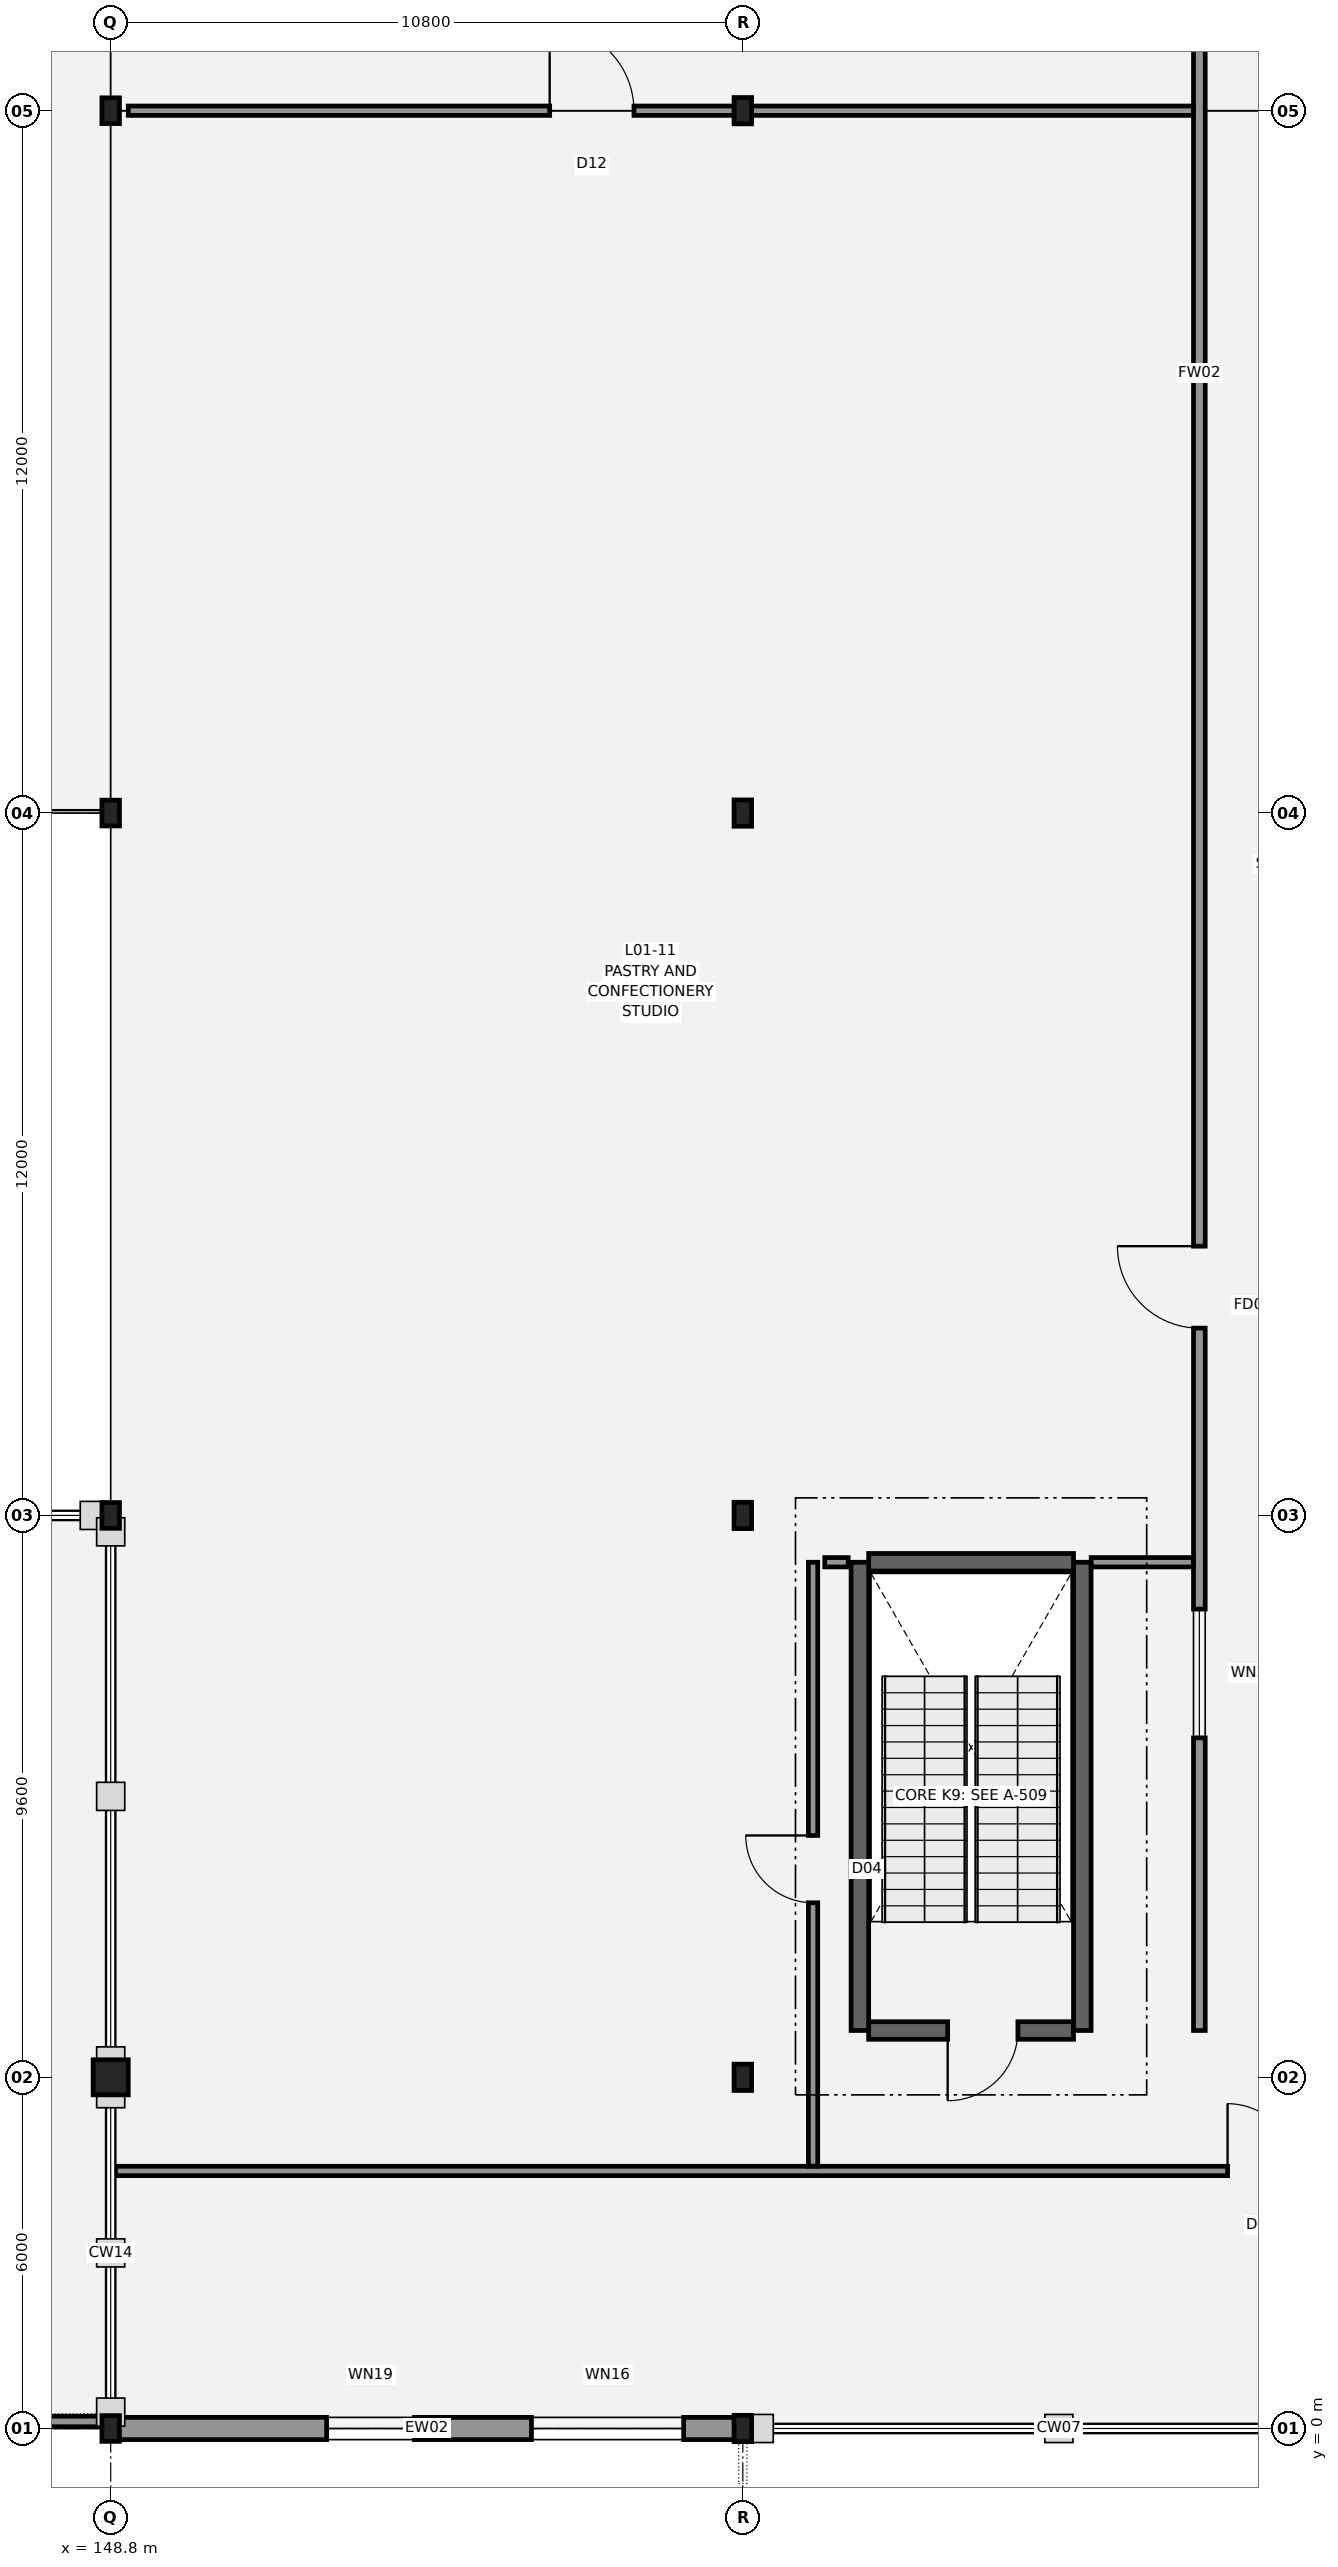
"""IFC4 building model, lengths in metres.
Left out: names, types, materials, properties, quantities, classifications, styles, units other than length and angle.
Written with IfcOpenShell. Run it as: python <this file> out.ifc"""

import sys

from ifc_helpers import new_model, si_unit, direction, frame, frame_2d, origin, origin_2d, place, context, subcontext, project, spatial, rectangle, i_section, extrude, element, fill, save


model = new_model("IFC4")
c1 = context("Model", 3, precision=1e-05, world=origin(), true_north=direction((0.0, 1.0)))
c2 = subcontext(c1, "Body", "Model", "MODEL_VIEW")
j1 = project(units=[si_unit("LENGTHUNIT", "METRE"), si_unit("PLANEANGLEUNIT", "RADIAN")], contexts=[c1])
p1 = place(None, origin())
s1 = spatial("IfcSite", under=j1, at=p1, CompositionType="ELEMENT")
p2 = place(p1, origin())
s2 = spatial("IfcBuilding", under=s1, at=p2, CompositionType="ELEMENT")
p3 = place(p2, frame((0.0, 0.0, 5.4)))
s3 = spatial("IfcBuildingStorey", under=s2, at=p3, CompositionType="ELEMENT", Elevation=5.4)
p4 = place(p3, frame((148.8, 0.0, 0.0), z_axis=(0.0, 0.0, 1.0), x_axis=(1.0, 0.0, 0.0)))
e1 = element("IfcColumn", 1, at=p4, inside=s3, PredefinedType="COLUMN", context=c2, shape_type="SweptSolid", body=[
    extrude(i_section(OverallWidth=0.3, OverallDepth=0.44, WebThickness=0.011, FlangeThickness=0.021, FilletRadius=0.027, at=origin_2d()), origin(), (0.0, 0.0, 1.0), 4.8),
])
p5 = place(p3, frame((148.8, 6.0, 0.0), z_axis=(0.0, 0.0, 1.0), x_axis=(1.0, 0.0, 0.0)))
e2 = element("IfcColumn", 2, at=p5, inside=s3, PredefinedType="COLUMN", context=c2, shape_type="SweptSolid", body=[
    extrude(rectangle(XDim=0.6, YDim=0.6, at=origin_2d()), origin(), (0.0, 0.0, 1.0), 4.8),
])
for number, where, z_axis, x_axis in (
    (3, (148.8, 15.6, 0.0), (0.0, 0.0, 1.0), (1.0, 0.0, 0.0)),
    (4, (148.8, 27.6, 0.0), (0.0, 0.0, 1.0), (1.0, 0.0, 0.0)),
    (5, (148.8, 39.6, 0.0), (0.0, 0.0, 1.0), (1.0, 0.0, 0.0)),
):
    element("IfcColumn", number, at=place(p3, frame(where, z_axis=z_axis, x_axis=x_axis)), inside=s3, PredefinedType="COLUMN", context=c2, shape_type="SweptSolid", body=[
        extrude(i_section(OverallWidth=0.3, OverallDepth=0.44, WebThickness=0.011, FlangeThickness=0.021, FilletRadius=0.027, at=origin_2d()), origin(), (0.0, 0.0, 1.0), 4.8),
    ])
for number, where, z_axis, x_axis in (
    (6, (159.6, 0.0, 0.0), (0.0, 0.0, 1.0), (1.0, 0.0, 0.0)),
    (7, (159.6, 6.0, 0.0), (0.0, 0.0, 1.0), (1.0, 0.0, 0.0)),
    (8, (159.6, 15.6, 0.0), (0.0, 0.0, 1.0), (1.0, 0.0, 0.0)),
    (9, (159.6, 27.6, 0.0), (0.0, 0.0, 1.0), (1.0, 0.0, 0.0)),
    (10, (159.6, 39.6, 0.0), (0.0, 0.0, 1.0), (1.0, 0.0, 0.0)),
):
    element("IfcColumn", number, at=place(p3, frame(where, z_axis=z_axis, x_axis=x_axis)), inside=s3, PredefinedType="COLUMN", context=c2, shape_type="SweptSolid", body=[
        extrude(i_section(OverallWidth=0.3, OverallDepth=0.45, WebThickness=0.014, FlangeThickness=0.026, FilletRadius=0.027, at=origin_2d()), origin(), (0.0, 0.0, 1.0), 4.8),
    ])
p6 = place(p3, frame((165.25, 6.8, 0.0), z_axis=(0.0, 0.0, 1.0), x_axis=(-1.0, 0.0, 0.0)))
e11 = element("IfcWall", 11, at=p6, inside=s3, PredefinedType="SHEAR", context=c2, shape_type="SweptSolid", body=[
    extrude(rectangle(XDim=3.5, YDim=0.3, at=frame_2d((1.75, 0.0))), origin(), (0.0, 0.0, 1.0), 4.49),
])
p7 = place(p6, frame((0.95, 0.0, 0.0)))
e12 = element("IfcOpeningElement", 12, at=p7, cuts=e11, PredefinedType="OPENING", context=c2, shape_type="SweptSolid", body=[
    extrude(rectangle(XDim=1.2, YDim=2.2, at=frame_2d((0.6, 1.1))), frame((0.0, 0.16, 0.0), z_axis=(0.0, -1.0, 0.0), x_axis=(1.0, 0.0, 0.0)), (0.0, 0.0, 1.0), 0.32),
])
p8 = place(p3, frame((165.4, 6.8, 0.0), z_axis=(0.0, 0.0, 1.0), x_axis=(0.0, 1.0, 0.0)))
e13 = element("IfcWall", 13, at=p8, inside=s3, PredefinedType="SHEAR", context=c2, shape_type="SweptSolid", body=[
    extrude(rectangle(XDim=8.0, YDim=0.3, at=frame_2d((4.0, 0.0))), origin(), (0.0, 0.0, 1.0), 4.49),
])
p9 = place(p3, frame((165.25, 14.8, 0.0), z_axis=(0.0, 0.0, 1.0), x_axis=(-1.0, 0.0, 0.0)))
e14 = element("IfcWall", 14, at=p9, inside=s3, PredefinedType="SHEAR", context=c2, shape_type="SweptSolid", body=[
    extrude(rectangle(XDim=3.5, YDim=0.3, at=frame_2d((1.75, 0.0))), origin(), (0.0, 0.0, 1.0), 4.49),
])
p10 = place(p3, frame((161.6, 14.8, 0.0), z_axis=(0.0, 0.0, 1.0), x_axis=(0.0, -1.0, 0.0)))
e15 = element("IfcWall", 15, at=p10, inside=s3, PredefinedType="SHEAR", context=c2, shape_type="SweptSolid", body=[
    extrude(rectangle(XDim=8.0, YDim=0.3, at=frame_2d((4.0, 0.0))), origin(), (0.0, 0.0, 1.0), 4.49),
])
p11 = place(p3, frame((159.589, 0.0, 0.0), z_axis=(0.0, 0.0, 1.0), x_axis=(-1.0, 0.0, 0.0)))
e16 = element("IfcWall", 16, at=p11, inside=s3, PredefinedType="STANDARD", context=c2, shape_type="SweptSolid", body=[
    extrude(rectangle(XDim=10.779, YDim=0.38, at=frame_2d((5.39, 0.0))), origin(), (0.0, 0.0, 1.0), 4.045),
])
p12 = place(p11, frame((1.0, 0.0, 0.8)))
e17 = element("IfcOpeningElement", 17, at=p12, cuts=e16, PredefinedType="OPENING", context=c2, shape_type="SweptSolid", body=[
    extrude(rectangle(XDim=2.6, YDim=1.4, at=frame_2d((1.3, 0.7))), frame((0.0, 0.2, 0.0), z_axis=(0.0, -1.0, 0.0), x_axis=(1.0, 0.0, 0.0)), (0.0, 0.0, 1.0), 0.4),
])
p13 = place(p11, frame((5.6, 0.0, 0.8)))
e18 = element("IfcOpeningElement", 18, at=p13, cuts=e16, PredefinedType="OPENING", context=c2, shape_type="SweptSolid", body=[
    extrude(rectangle(XDim=1.5, YDim=1.6, at=frame_2d((0.75, 0.8))), frame((0.0, 0.2, 0.0), z_axis=(0.0, -1.0, 0.0), x_axis=(1.0, 0.0, 0.0)), (0.0, 0.0, 1.0), 0.4),
])
p14 = place(p3, frame((125.0, 0.12, 0.6), z_axis=(0.0, 0.0, 1.0), x_axis=(1.0, 0.0, 0.0)))
e19 = element("IfcWall", 19, at=p14, inside=s3, PredefinedType="PARAPET", context=c2, shape_type="SweptSolid", body=[
    extrude(rectangle(XDim=23.6, YDim=0.18, at=frame_2d((11.8, 0.0))), origin(), (0.0, 0.0, 1.0), 0.26),
])
p15 = place(p3, frame((148.882, 4.4, 0.0), z_axis=(0.0, 0.0, 1.0), x_axis=(1.0, 0.0, 0.0)))
e20 = element("IfcWall", 20, at=p15, inside=s3, PredefinedType="PARTITIONING", context=c2, shape_type="SweptSolid", body=[
    extrude(rectangle(XDim=42.926, YDim=0.16, at=frame_2d((21.463, 0.0))), origin(), (0.0, 0.0, 1.0), 4.44),
])
p16 = place(p15, frame((19.0, 0.0, 0.0)))
e21 = element("IfcOpeningElement", 21, at=p16, cuts=e20, PredefinedType="OPENING", context=c2, shape_type="SweptSolid", body=[
    extrude(rectangle(XDim=1.15, YDim=2.15, at=frame_2d((0.575, 1.075))), frame((0.0, 0.09, 0.0), z_axis=(0.0, -1.0, 0.0), x_axis=(1.0, 0.0, 0.0)), (0.0, 0.0, 1.0), 0.18),
])
p17 = place(p3, frame((167.4, 6.8, 0.0), z_axis=(0.0, 0.0, 1.0), x_axis=(0.0, 1.0, 0.0)))
e22 = element("IfcWall", 22, at=p17, inside=s3, PredefinedType="PARTITIONING", context=c2, shape_type="SweptSolid", body=[
    extrude(rectangle(XDim=56.628, YDim=0.2, at=frame_2d((28.314, 0.0))), origin(), (0.0, 0.0, 1.0), 4.44),
])
p18 = place(p17, frame((12.0, 0.0, 0.0)))
e23 = element("IfcOpeningElement", 23, at=p18, cuts=e22, PredefinedType="OPENING", context=c2, shape_type="SweptSolid", body=[
    extrude(rectangle(XDim=1.4, YDim=2.2, at=frame_2d((0.7, 1.1))), frame((0.0, 0.11, 0.0), z_axis=(0.0, -1.0, 0.0), x_axis=(1.0, 0.0, 0.0)), (0.0, 0.0, 1.0), 0.22),
])
p19 = place(p17, frame((40.133, 0.0, 0.0)))
e24 = element("IfcOpeningElement", 24, at=p19, cuts=e22, PredefinedType="OPENING", context=c2, shape_type="SweptSolid", body=[
    extrude(rectangle(XDim=1.4, YDim=2.2, at=frame_2d((0.7, 1.1))), frame((0.0, 0.11, 0.0), z_axis=(0.0, -1.0, 0.0), x_axis=(1.0, 0.0, 0.0)), (0.0, 0.0, 1.0), 0.22),
])
p20 = place(p17, frame((5.0, 0.0, 1.05)))
e25 = element("IfcOpeningElement", 25, at=p20, cuts=e22, PredefinedType="OPENING", context=c2, shape_type="SweptSolid", body=[
    extrude(rectangle(XDim=2.2, YDim=1.3, at=frame_2d((1.1, 0.65))), frame((0.0, 0.11, 0.0), z_axis=(0.0, -1.0, 0.0), x_axis=(1.0, 0.0, 0.0)), (0.0, 0.0, 1.0), 0.22),
])
p21 = place(p3, frame((160.8, 4.482, 0.0), z_axis=(0.0, 0.0, 1.0), x_axis=(0.0, 1.0, 0.0)))
e26 = element("IfcWall", 26, at=p21, inside=s3, PredefinedType="PARTITIONING", context=c2, shape_type="SweptSolid", body=[
    extrude(rectangle(XDim=10.318, YDim=0.16, at=frame_2d((5.159, 0.0))), origin(), (0.0, 0.0, 1.0), 4.44),
])
p22 = place(p21, frame((4.5, 0.0, 0.0)))
e27 = element("IfcOpeningElement", 27, at=p22, cuts=e26, PredefinedType="OPENING", context=c2, shape_type="SweptSolid", body=[
    extrude(rectangle(XDim=1.15, YDim=2.15, at=frame_2d((0.575, 1.075))), frame((0.0, 0.09, 0.0), z_axis=(0.0, -1.0, 0.0), x_axis=(1.0, 0.0, 0.0)), (0.0, 0.0, 1.0), 0.18),
])
p23 = place(p3, frame((161.0, 14.8, 0.0), z_axis=(0.0, 0.0, 1.0), x_axis=(1.0, 0.0, 0.0)))
e28 = element("IfcWall", 28, at=p23, inside=s3, PredefinedType="PARTITIONING", context=c2, shape_type="SweptSolid", body=[
    extrude(rectangle(XDim=0.4, YDim=0.16, at=frame_2d((0.2, 0.0))), origin(), (0.0, 0.0, 1.0), 4.44),
])
p24 = place(p3, frame((165.552, 14.8, 0.0), z_axis=(0.0, 0.0, 1.0), x_axis=(1.0, 0.0, 0.0)))
e29 = element("IfcWall", 29, at=p24, inside=s3, PredefinedType="PARTITIONING", context=c2, shape_type="SweptSolid", body=[
    extrude(rectangle(XDim=1.746, YDim=0.16, at=frame_2d((0.873, 0.0))), origin(), (0.0, 0.0, 1.0), 4.44),
])
p25 = place(p3, frame((149.1, 39.6, 0.0), z_axis=(0.0, 0.0, 1.0), x_axis=(1.0, 0.0, 0.0)))
e30 = element("IfcWall", 30, at=p25, inside=s3, PredefinedType="PARTITIONING", context=c2, shape_type="SweptSolid", body=[
    extrude(rectangle(XDim=18.198, YDim=0.16, at=frame_2d((9.099, 0.0))), origin(), (0.0, 0.0, 1.0), 4.045),
])
p26 = place(p25, frame((7.2, 0.0, 0.0)))
e31 = element("IfcOpeningElement", 31, at=p26, cuts=e30, PredefinedType="OPENING", context=c2, shape_type="SweptSolid", body=[
    extrude(rectangle(XDim=1.44, YDim=2.15, at=frame_2d((0.72, 1.075))), frame((0.0, 0.09, 0.0), z_axis=(0.0, -1.0, 0.0), x_axis=(1.0, 0.0, 0.0)), (0.0, 0.0, 1.0), 0.18),
])
p27 = place(p12, origin())
e32 = element("IfcWindow", 32, at=p27, inside=s3, PartitioningType="SINGLE_PANEL", PredefinedType="WINDOW", context=c2, shape_type="SweptSolid", body=[
    extrude(rectangle(XDim=2.6, YDim=1.4, at=frame_2d((1.3, 0.7))), frame((0.0, 0.03, 0.0), z_axis=(0.0, -1.0, 0.0), x_axis=(1.0, 0.0, 0.0)), (0.0, 0.0, 1.0), 0.06),
])
fill(e17, e32)
p28 = place(p13, origin())
e33 = element("IfcWindow", 33, at=p28, inside=s3, PartitioningType="SINGLE_PANEL", PredefinedType="WINDOW", context=c2, shape_type="SweptSolid", body=[
    extrude(rectangle(XDim=1.5, YDim=1.6, at=frame_2d((0.75, 0.8))), frame((0.0, 0.03, 0.0), z_axis=(0.0, -1.0, 0.0), x_axis=(1.0, 0.0, 0.0)), (0.0, 0.0, 1.0), 0.06),
])
fill(e18, e33)
p29 = place(p16, origin())
e34 = element("IfcDoor", 34, at=p29, inside=s3, OperationType="SINGLE_SWING_LEFT", PredefinedType="DOOR", context=c2, shape_type="SweptSolid", body=[
    extrude(rectangle(XDim=1.15, YDim=2.15, at=frame_2d((0.575, 1.075))), frame((0.0, 0.025, 0.0), z_axis=(0.0, -1.0, 0.0), x_axis=(1.0, 0.0, 0.0)), (0.0, 0.0, 1.0), 0.05),
])
fill(e21, e34)
p30 = place(p18, origin())
e35 = element("IfcDoor", 35, at=p30, inside=s3, OperationType="SINGLE_SWING_RIGHT", PredefinedType="DOOR", context=c2, shape_type="SweptSolid", body=[
    extrude(rectangle(XDim=1.4, YDim=2.2, at=frame_2d((0.7, 1.1))), frame((0.0, 0.025, 0.0), z_axis=(0.0, -1.0, 0.0), x_axis=(1.0, 0.0, 0.0)), (0.0, 0.0, 1.0), 0.05),
])
fill(e23, e35)
p31 = place(p22, origin())
e36 = element("IfcDoor", 36, at=p31, inside=s3, OperationType="SINGLE_SWING_RIGHT", PredefinedType="DOOR", context=c2, shape_type="SweptSolid", body=[
    extrude(rectangle(XDim=1.15, YDim=2.15, at=frame_2d((0.575, 1.075))), frame((0.0, 0.025, 0.0), z_axis=(0.0, -1.0, 0.0), x_axis=(1.0, 0.0, 0.0)), (0.0, 0.0, 1.0), 0.05),
])
fill(e27, e36)
p32 = place(p26, origin())
e37 = element("IfcDoor", 37, at=p32, inside=s3, OperationType="SINGLE_SWING_LEFT", PredefinedType="DOOR", context=c2, shape_type="SweptSolid", body=[
    extrude(rectangle(XDim=1.44, YDim=2.15, at=frame_2d((0.72, 1.075))), frame((0.0, 0.025, 0.0), z_axis=(0.0, -1.0, 0.0), x_axis=(1.0, 0.0, 0.0)), (0.0, 0.0, 1.0), 0.05),
])
fill(e31, e37)
p33 = place(p20, origin())
e38 = element("IfcWindow", 38, at=p33, inside=s3, PartitioningType="SINGLE_PANEL", PredefinedType="WINDOW", context=c2, shape_type="SweptSolid", body=[
    extrude(rectangle(XDim=2.2, YDim=1.3, at=frame_2d((1.1, 0.65))), frame((0.0, 0.03, 0.0), z_axis=(0.0, -1.0, 0.0), x_axis=(1.0, 0.0, 0.0)), (0.0, 0.0, 1.0), 0.06),
])
fill(e25, e38)
p34 = place(p7, origin())
e39 = element("IfcDoor", 39, at=p34, inside=s3, OperationType="SINGLE_SWING_RIGHT", PredefinedType="DOOR", context=c2, shape_type="SweptSolid", body=[
    extrude(rectangle(XDim=1.2, YDim=2.2, at=frame_2d((0.6, 1.1))), frame((0.0, 0.025, 0.0), z_axis=(0.0, -1.0, 0.0), x_axis=(1.0, 0.0, 0.0)), (0.0, 0.0, 1.0), 0.05),
])
fill(e12, e39)
save(model, sys.argv[1])
